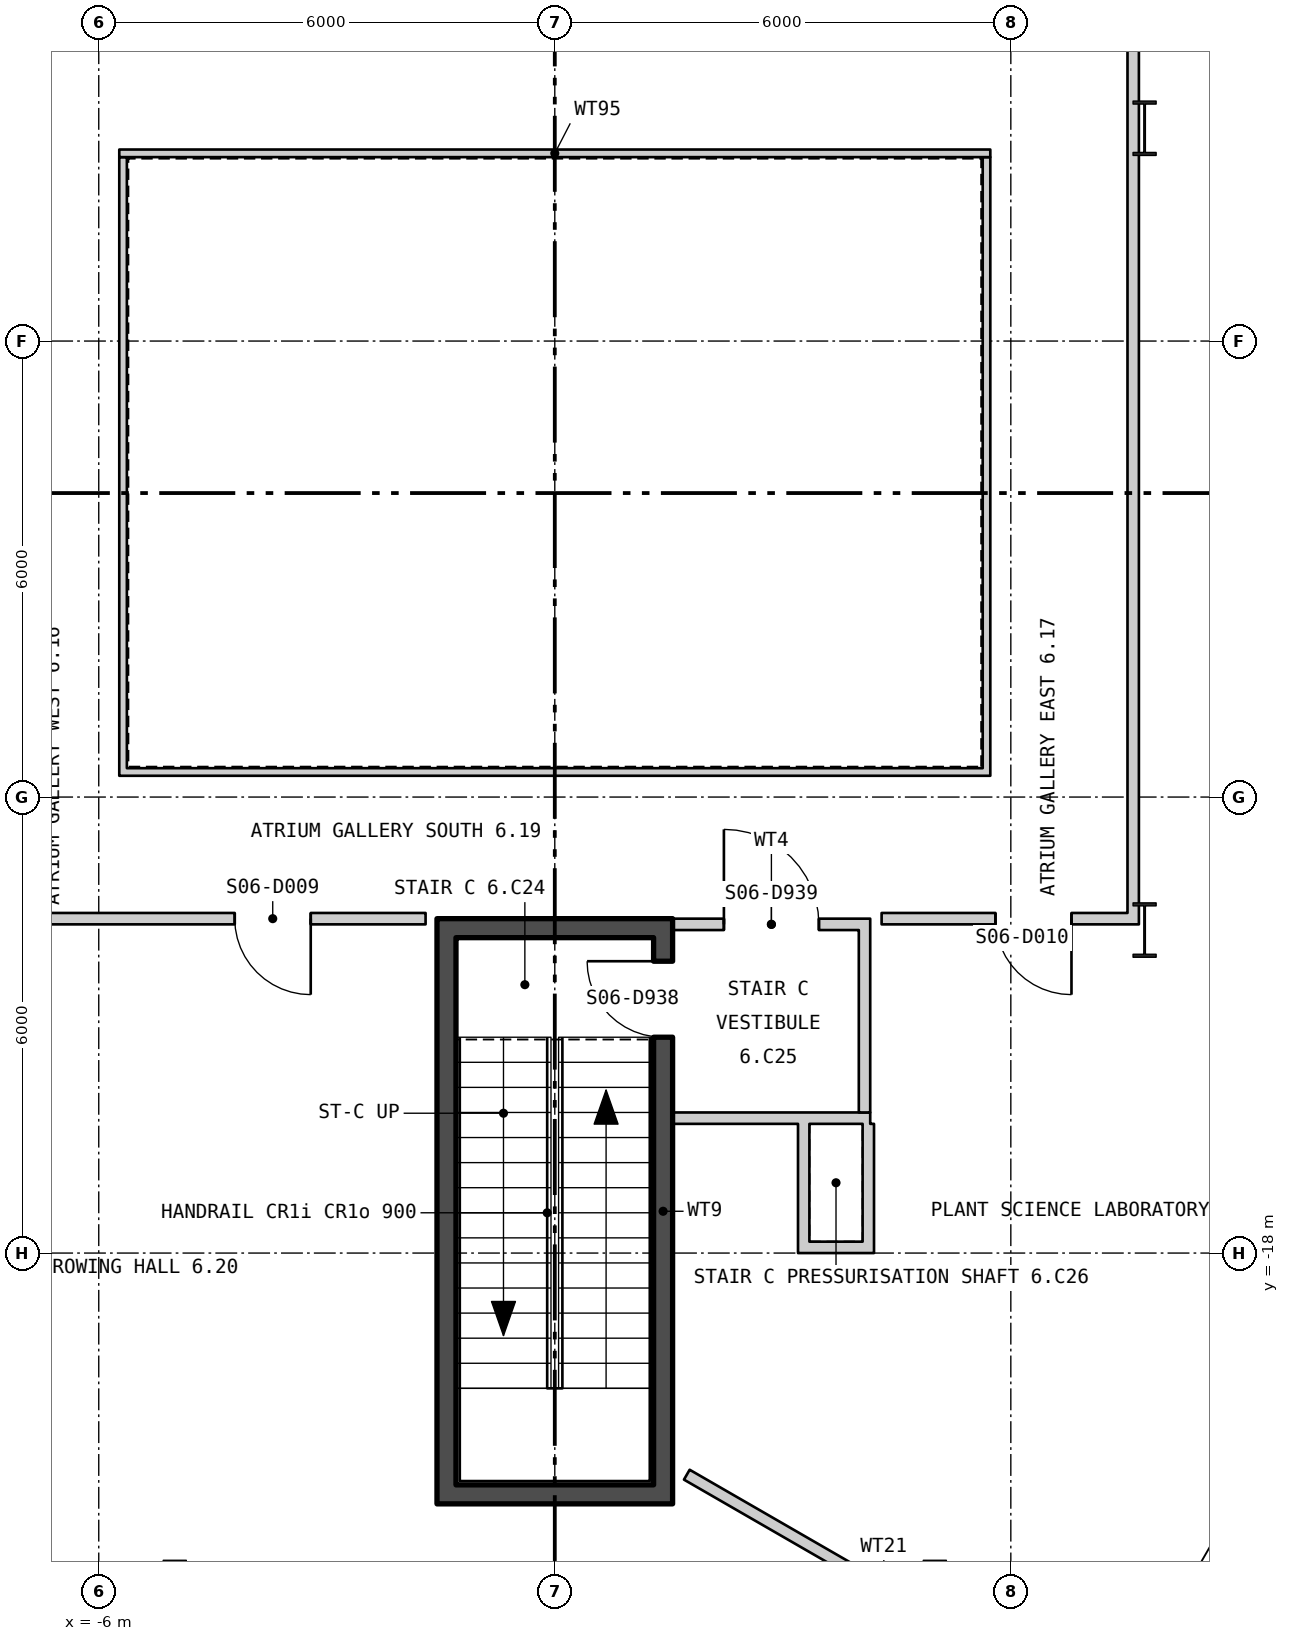
"""IFC4 building model, lengths in metres.
Left out: names, types, materials, properties, quantities, classifications, styles, units other than length and angle.
Written with IfcOpenShell. Run it as: python <this file> out.ifc"""

import sys

from ifc_helpers import new_model, si_unit, direction, frame, frame_2d, origin, origin_2d, place, context, subcontext, project, spatial, polyline, rectangle, i_section, outline, extrude, element, fill, save


model = new_model("IFC4")
c1 = context("Model", 3, precision=1e-05, world=origin(), true_north=direction((0.0, 1.0)))
c2 = subcontext(c1, "Body", "Model", "MODEL_VIEW")
j1 = project(units=[si_unit("LENGTHUNIT", "METRE"), si_unit("PLANEANGLEUNIT", "RADIAN")], contexts=[c1])
p1 = place(None, origin())
s1 = spatial("IfcSite", under=j1, at=p1, CompositionType="ELEMENT")
p2 = place(p1, origin())
s2 = spatial("IfcBuilding", under=s1, at=p2, CompositionType="ELEMENT")
p3 = place(p2, frame((0.0, 0.0, 84.3)))
s3 = spatial("IfcBuildingStorey", under=s2, at=p3, CompositionType="ELEMENT", Elevation=84.3)
for number, where, z_axis, x_axis in (
    (1, (7.76, -3.2, 0.0), (0.0, 0.0, 1.0), (1.0, 0.0, 0.0)),
    (2, (7.76, -13.75, 0.0), (0.0, 0.0, 1.0), (1.0, 0.0, 0.0)),
    (3, (5.0, -22.4, 0.0), (0.0, 0.0, 1.0), (1.0, 0.0, 0.0)),
    (4, (-5.0, -22.4, 0.0), (0.0, 0.0, 1.0), (1.0, 0.0, 0.0)),
):
    element("IfcColumn", number, at=place(p3, frame(where, z_axis=z_axis, x_axis=x_axis)), inside=s3, PredefinedType="COLUMN", context=c2, shape_type="SweptSolid", body=[
        extrude(i_section(OverallWidth=0.304, OverallDepth=0.716, WebThickness=0.021, FlangeThickness=0.04, at=origin_2d()), origin(), (0.0, 0.0, 1.0), 4.5),
    ])
p4 = place(p3, frame((-27.95, 11.167, -0.18), z_axis=(0.0, 0.0, 1.0), x_axis=(0.499999194392, -0.866025868902, 0.0)))
e5 = element("IfcWall", 5, at=p4, inside=s3, PredefinedType="SOLIDWALL", context=c2, shape_type="SweptSolid", body=[
    extrude(outline(polyline([(-0.13, -0.225), (45.86, -0.225), (45.6, 0.225), (0.13, 0.225), (-0.13, -0.225)])), origin(), (0.0, 0.0, 1.0), 4.28),
])
p5 = place(p4, frame((5.892, 0.0, 1.08)))
e6 = element("IfcOpeningElement", 6, at=p5, cuts=e5, PredefinedType="OPENING", context=c2, shape_type="SweptSolid", body=[
    extrude(rectangle(XDim=2.4, YDim=2.6, at=frame_2d((1.2, 1.3))), frame((0.0, 0.235, 0.0), z_axis=(0.0, -1.0, 0.0), x_axis=(1.0, 0.0, 0.0)), (0.0, 0.0, 1.0), 0.47),
])
p6 = place(p4, frame((10.399, 0.0, 1.08)))
e7 = element("IfcOpeningElement", 7, at=p6, cuts=e5, PredefinedType="OPENING", context=c2, shape_type="SweptSolid", body=[
    extrude(rectangle(XDim=2.4, YDim=2.6, at=frame_2d((1.2, 1.3))), frame((0.0, 0.235, 0.0), z_axis=(0.0, -1.0, 0.0), x_axis=(1.0, 0.0, 0.0)), (0.0, 0.0, 1.0), 0.47),
])
p7 = place(p4, frame((14.905, 0.0, 1.08)))
e8 = element("IfcOpeningElement", 8, at=p7, cuts=e5, PredefinedType="OPENING", context=c2, shape_type="SweptSolid", body=[
    extrude(rectangle(XDim=2.4, YDim=2.6, at=frame_2d((1.2, 1.3))), frame((0.0, 0.235, 0.0), z_axis=(0.0, -1.0, 0.0), x_axis=(1.0, 0.0, 0.0)), (0.0, 0.0, 1.0), 0.47),
])
p8 = place(p4, frame((19.412, 0.0, 1.08)))
e9 = element("IfcOpeningElement", 9, at=p8, cuts=e5, PredefinedType="OPENING", context=c2, shape_type="SweptSolid", body=[
    extrude(rectangle(XDim=2.4, YDim=2.6, at=frame_2d((1.2, 1.3))), frame((0.0, 0.235, 0.0), z_axis=(0.0, -1.0, 0.0), x_axis=(1.0, 0.0, 0.0)), (0.0, 0.0, 1.0), 0.47),
])
p9 = place(p4, frame((23.918, 0.0, 1.08)))
e10 = element("IfcOpeningElement", 10, at=p9, cuts=e5, PredefinedType="OPENING", context=c2, shape_type="SweptSolid", body=[
    extrude(rectangle(XDim=2.4, YDim=2.6, at=frame_2d((1.2, 1.3))), frame((0.0, 0.235, 0.0), z_axis=(0.0, -1.0, 0.0), x_axis=(1.0, 0.0, 0.0)), (0.0, 0.0, 1.0), 0.47),
])
p10 = place(p4, frame((28.425, 0.0, 1.08)))
e11 = element("IfcOpeningElement", 11, at=p10, cuts=e5, PredefinedType="OPENING", context=c2, shape_type="SweptSolid", body=[
    extrude(rectangle(XDim=2.4, YDim=2.6, at=frame_2d((1.2, 1.3))), frame((0.0, 0.235, 0.0), z_axis=(0.0, -1.0, 0.0), x_axis=(1.0, 0.0, 0.0)), (0.0, 0.0, 1.0), 0.47),
])
p11 = place(p4, frame((32.932, 0.0, 1.08)))
e12 = element("IfcOpeningElement", 12, at=p11, cuts=e5, PredefinedType="OPENING", context=c2, shape_type="SweptSolid", body=[
    extrude(rectangle(XDim=2.4, YDim=2.6, at=frame_2d((1.2, 1.3))), frame((0.0, 0.235, 0.0), z_axis=(0.0, -1.0, 0.0), x_axis=(1.0, 0.0, 0.0)), (0.0, 0.0, 1.0), 0.47),
])
p12 = place(p4, frame((37.438, 0.0, 1.08)))
e13 = element("IfcOpeningElement", 13, at=p12, cuts=e5, PredefinedType="OPENING", context=c2, shape_type="SweptSolid", body=[
    extrude(rectangle(XDim=2.4, YDim=2.6, at=frame_2d((1.2, 1.3))), frame((0.0, 0.235, 0.0), z_axis=(0.0, -1.0, 0.0), x_axis=(1.0, 0.0, 0.0)), (0.0, 0.0, 1.0), 0.47),
])
p13 = place(p4, frame((41.907, 0.0, 1.08)))
e14 = element("IfcOpeningElement", 14, at=p13, cuts=e5, PredefinedType="OPENING", context=c2, shape_type="SweptSolid", body=[
    extrude(rectangle(XDim=2.4, YDim=2.6, at=frame_2d((1.2, 1.3))), frame((0.0, 0.235, 0.0), z_axis=(0.0, -1.0, 0.0), x_axis=(1.0, 0.0, 0.0)), (0.0, 0.0, 1.0), 0.47),
])
p14 = place(p3, frame((5.085, -28.436, -0.18), z_axis=(0.0, 0.0, 1.0), x_axis=(0.499999194392, 0.866025868902, 0.0)))
e15 = element("IfcWall", 15, at=p14, inside=s3, PredefinedType="SOLIDWALL", context=c2, shape_type="SweptSolid", body=[
    extrude(outline(polyline([(-0.13, -0.225), (45.86, -0.225), (45.6, 0.225), (0.13, 0.225), (-0.13, -0.225)])), origin(), (0.0, 0.0, 1.0), 4.28),
])
p15 = place(p14, frame((1.424, 0.0, 1.08)))
e16 = element("IfcOpeningElement", 16, at=p15, cuts=e15, PredefinedType="OPENING", context=c2, shape_type="SweptSolid", body=[
    extrude(rectangle(XDim=2.4, YDim=2.6, at=frame_2d((1.2, 1.3))), frame((0.0, 0.235, 0.0), z_axis=(0.0, -1.0, 0.0), x_axis=(1.0, 0.0, 0.0)), (0.0, 0.0, 1.0), 0.47),
])
p16 = place(p14, frame((5.892, 0.0, 1.08)))
e17 = element("IfcOpeningElement", 17, at=p16, cuts=e15, PredefinedType="OPENING", context=c2, shape_type="SweptSolid", body=[
    extrude(rectangle(XDim=2.4, YDim=2.6, at=frame_2d((1.2, 1.3))), frame((0.0, 0.235, 0.0), z_axis=(0.0, -1.0, 0.0), x_axis=(1.0, 0.0, 0.0)), (0.0, 0.0, 1.0), 0.47),
])
p17 = place(p14, frame((10.399, 0.0, 1.08)))
e18 = element("IfcOpeningElement", 18, at=p17, cuts=e15, PredefinedType="OPENING", context=c2, shape_type="SweptSolid", body=[
    extrude(rectangle(XDim=2.4, YDim=2.6, at=frame_2d((1.2, 1.3))), frame((0.0, 0.235, 0.0), z_axis=(0.0, -1.0, 0.0), x_axis=(1.0, 0.0, 0.0)), (0.0, 0.0, 1.0), 0.47),
])
p18 = place(p14, frame((14.905, 0.0, 1.08)))
e19 = element("IfcOpeningElement", 19, at=p18, cuts=e15, PredefinedType="OPENING", context=c2, shape_type="SweptSolid", body=[
    extrude(rectangle(XDim=2.4, YDim=2.6, at=frame_2d((1.2, 1.3))), frame((0.0, 0.235, 0.0), z_axis=(0.0, -1.0, 0.0), x_axis=(1.0, 0.0, 0.0)), (0.0, 0.0, 1.0), 0.47),
])
p19 = place(p14, frame((19.412, 0.0, 1.08)))
e20 = element("IfcOpeningElement", 20, at=p19, cuts=e15, PredefinedType="OPENING", context=c2, shape_type="SweptSolid", body=[
    extrude(rectangle(XDim=2.4, YDim=2.6, at=frame_2d((1.2, 1.3))), frame((0.0, 0.235, 0.0), z_axis=(0.0, -1.0, 0.0), x_axis=(1.0, 0.0, 0.0)), (0.0, 0.0, 1.0), 0.47),
])
p20 = place(p14, frame((23.918, 0.0, 1.08)))
e21 = element("IfcOpeningElement", 21, at=p20, cuts=e15, PredefinedType="OPENING", context=c2, shape_type="SweptSolid", body=[
    extrude(rectangle(XDim=2.4, YDim=2.6, at=frame_2d((1.2, 1.3))), frame((0.0, 0.235, 0.0), z_axis=(0.0, -1.0, 0.0), x_axis=(1.0, 0.0, 0.0)), (0.0, 0.0, 1.0), 0.47),
])
p21 = place(p14, frame((28.425, 0.0, 1.08)))
e22 = element("IfcOpeningElement", 22, at=p21, cuts=e15, PredefinedType="OPENING", context=c2, shape_type="SweptSolid", body=[
    extrude(rectangle(XDim=2.4, YDim=2.6, at=frame_2d((1.2, 1.3))), frame((0.0, 0.235, 0.0), z_axis=(0.0, -1.0, 0.0), x_axis=(1.0, 0.0, 0.0)), (0.0, 0.0, 1.0), 0.47),
])
p22 = place(p14, frame((32.932, 0.0, 1.08)))
e23 = element("IfcOpeningElement", 23, at=p22, cuts=e15, PredefinedType="OPENING", context=c2, shape_type="SweptSolid", body=[
    extrude(rectangle(XDim=2.4, YDim=2.6, at=frame_2d((1.2, 1.3))), frame((0.0, 0.235, 0.0), z_axis=(0.0, -1.0, 0.0), x_axis=(1.0, 0.0, 0.0)), (0.0, 0.0, 1.0), 0.47),
])
p23 = place(p14, frame((37.438, 0.0, 1.08)))
e24 = element("IfcOpeningElement", 24, at=p23, cuts=e15, PredefinedType="OPENING", context=c2, shape_type="SweptSolid", body=[
    extrude(rectangle(XDim=2.4, YDim=2.6, at=frame_2d((1.2, 1.3))), frame((0.0, 0.235, 0.0), z_axis=(0.0, -1.0, 0.0), x_axis=(1.0, 0.0, 0.0)), (0.0, 0.0, 1.0), 0.47),
])
p24 = place(p14, frame((41.907, 0.0, 1.08)))
e25 = element("IfcOpeningElement", 25, at=p24, cuts=e15, PredefinedType="OPENING", context=c2, shape_type="SweptSolid", body=[
    extrude(rectangle(XDim=2.4, YDim=2.6, at=frame_2d((1.2, 1.3))), frame((0.0, 0.235, 0.0), z_axis=(0.0, -1.0, 0.0), x_axis=(1.0, 0.0, 0.0)), (0.0, 0.0, 1.0), 0.47),
])
p25 = place(p3, frame((-5.73, -11.67, 0.0), z_axis=(0.0, 0.0, 1.0), x_axis=(1.0, 0.0, 0.0)))
e26 = element("IfcWall", 26, at=p25, inside=s3, PredefinedType="PARTITIONING", context=c2, shape_type="SweptSolid", body=[
    extrude(rectangle(XDim=11.46, YDim=0.1, at=frame_2d((5.73, 0.0))), origin(), (0.0, 0.0, 1.0), 4.3),
])
p26 = place(p3, frame((5.68, -11.62, 0.0), z_axis=(0.0, 0.0, 1.0), x_axis=(0.0, 1.0, 0.0)))
e27 = element("IfcWall", 27, at=p26, inside=s3, PredefinedType="PARTITIONING", context=c2, shape_type="SweptSolid", body=[
    extrude(rectangle(XDim=8.04, YDim=0.1, at=frame_2d((4.02, 0.0))), origin(), (0.0, 0.0, 1.0), 4.3),
])
p27 = place(p3, frame((5.73, -3.53, 0.0), z_axis=(0.0, 0.0, 1.0), x_axis=(-1.0, 0.0, 0.0)))
e28 = element("IfcWall", 28, at=p27, inside=s3, PredefinedType="PARTITIONING", context=c2, shape_type="SweptSolid", body=[
    extrude(rectangle(XDim=11.46, YDim=0.1, at=frame_2d((5.73, 0.0))), origin(), (0.0, 0.0, 1.0), 4.3),
])
p28 = place(p3, frame((-5.68, -3.58, 0.0), z_axis=(0.0, 0.0, 1.0), x_axis=(0.0, -1.0, 0.0)))
e29 = element("IfcWall", 29, at=p28, inside=s3, PredefinedType="PARTITIONING", context=c2, shape_type="SweptSolid", body=[
    extrude(rectangle(XDim=8.04, YDim=0.1, at=frame_2d((4.02, 0.0))), origin(), (0.0, 0.0, 1.0), 4.3),
])
p29 = place(p3, frame((-1.425, -21.05, 0.0), z_axis=(0.0, 0.0, 1.0), x_axis=(0.0, 1.0, 0.0)))
e30 = element("IfcWall", 30, at=p29, inside=s3, PredefinedType="SHEAR", context=c2, shape_type="SweptSolid", body=[
    extrude(rectangle(XDim=7.2, YDim=0.25, at=frame_2d((3.6, 0.0))), origin(), (0.0, 0.0, 1.0), 4.3),
])
p30 = place(p3, frame((1.425, -21.05, 0.0), z_axis=(0.0, 0.0, 1.0), x_axis=(0.0, 1.0, 0.0)))
e31 = element("IfcWall", 31, at=p30, inside=s3, PredefinedType="SHEAR", context=c2, shape_type="SweptSolid", body=[
    extrude(rectangle(XDim=7.2, YDim=0.25, at=frame_2d((3.6, 0.0))), origin(), (0.0, 0.0, 1.0), 4.3),
])
p31 = place(p30, frame((5.89, 0.0, 0.0)))
e32 = element("IfcOpeningElement", 32, at=p31, cuts=e31, PredefinedType="OPENING", context=c2, shape_type="SweptSolid", body=[
    extrude(rectangle(XDim=1.0, YDim=2.1, at=frame_2d((0.5, 1.05))), frame((0.0, 0.135, 0.0), z_axis=(0.0, -1.0, 0.0), x_axis=(1.0, 0.0, 0.0)), (0.0, 0.0, 1.0), 0.27),
])
for number, where, z_axis, x_axis in (
    (33, (-1.55, -21.175, 0.0), (0.0, 0.0, 1.0), (1.0, 0.0, 0.0)),
    (34, (-1.55, -13.725, 0.0), (0.0, 0.0, 1.0), (1.0, 0.0, 0.0)),
):
    element("IfcWall", number, at=place(p3, frame(where, z_axis=z_axis, x_axis=x_axis)), inside=s3, PredefinedType="SHEAR", context=c2, shape_type="SweptSolid", body=[
        extrude(rectangle(XDim=3.1, YDim=0.25, at=frame_2d((1.55, 0.0))), origin(), (0.0, 0.0, 1.0), 4.3),
    ])
p32 = place(p3, frame((1.55, -16.225, 0.0), z_axis=(0.0, 0.0, 1.0), x_axis=(1.0, 0.0, 0.0)))
e35 = element("IfcWall", 35, at=p32, inside=s3, PredefinedType="PARTITIONING", context=c2, shape_type="SweptSolid", body=[
    extrude(rectangle(XDim=2.6, YDim=0.15, at=frame_2d((1.3, 0.0))), origin(), (0.0, 0.0, 1.0), 4.3),
])
p33 = place(p3, frame((4.075, -16.15, 0.0), z_axis=(0.0, 0.0, 1.0), x_axis=(0.0, 1.0, 0.0)))
e36 = element("IfcWall", 36, at=p33, inside=s3, PredefinedType="PARTITIONING", context=c2, shape_type="SweptSolid", body=[
    extrude(rectangle(XDim=2.4, YDim=0.15, at=frame_2d((1.2, 0.0))), origin(), (0.0, 0.0, 1.0), 4.3),
])
p34 = place(p3, frame((1.55, -13.675, 0.0), z_axis=(0.0, 0.0, 1.0), x_axis=(1.0, 0.0, 0.0)))
e37 = element("IfcWall", 37, at=p34, inside=s3, PredefinedType="PARTITIONING", context=c2, shape_type="SweptSolid", body=[
    extrude(rectangle(XDim=2.6, YDim=0.15, at=frame_2d((1.3, 0.0))), origin(), (0.0, 0.0, 1.0), 3.39),
])
p35 = place(p34, frame((0.675, 0.0, 0.0)))
e38 = element("IfcOpeningElement", 38, at=p35, cuts=e37, PredefinedType="OPENING", context=c2, shape_type="SweptSolid", body=[
    extrude(rectangle(XDim=1.25, YDim=2.1, at=frame_2d((0.625, 1.05))), frame((0.0, 0.085, 0.0), z_axis=(0.0, -1.0, 0.0), x_axis=(1.0, 0.0, 0.0)), (0.0, 0.0, 1.0), 0.17),
])
p36 = place(p3, frame((3.275, -18.0, 0.0), z_axis=(0.0, 0.0, 1.0), x_axis=(0.0, 1.0, 0.0)))
e39 = element("IfcWall", 39, at=p36, inside=s3, PredefinedType="PARTITIONING", context=c2, shape_type="SweptSolid", body=[
    extrude(rectangle(XDim=1.7, YDim=0.15, at=frame_2d((0.85, 0.0))), origin(), (0.0, 0.0, 1.0), 3.7),
])
p37 = place(p3, frame((3.35, -17.925, 0.0), z_axis=(0.0, 0.0, 1.0), x_axis=(1.0, 0.0, 0.0)))
e40 = element("IfcWall", 40, at=p37, inside=s3, PredefinedType="PARTITIONING", context=c2, shape_type="SweptSolid", body=[
    extrude(rectangle(XDim=0.7, YDim=0.15, at=frame_2d((0.35, 0.0))), origin(), (0.0, 0.0, 1.0), 4.3),
])
p38 = place(p3, frame((4.125, -18.0, 0.0), z_axis=(0.0, 0.0, 1.0), x_axis=(0.0, 1.0, 0.0)))
e41 = element("IfcWall", 41, at=p38, inside=s3, PredefinedType="PARTITIONING", context=c2, shape_type="SweptSolid", body=[
    extrude(rectangle(XDim=1.7, YDim=0.15, at=frame_2d((0.85, 0.0))), origin(), (0.0, 0.0, 1.0), 4.3),
])
p39 = place(p3, frame((-7.535, -13.6, 0.0), z_axis=(0.0, 0.0, 1.0), x_axis=(1.0, 0.0, 0.0)))
e42 = element("IfcWall", 42, at=p39, inside=s3, PredefinedType="PARTITIONING", context=c2, shape_type="SweptSolid", body=[
    extrude(rectangle(XDim=5.835, YDim=0.15, at=frame_2d((2.917, 0.0))), origin(), (0.0, 0.0, 1.0), 3.39),
])
p40 = place(p39, frame((3.324, 0.0, 0.0)))
e43 = element("IfcOpeningElement", 43, at=p40, cuts=e42, PredefinedType="OPENING", context=c2, shape_type="SweptSolid", body=[
    extrude(rectangle(XDim=1.0, YDim=2.1, at=frame_2d((0.5, 1.05))), frame((0.0, 0.085, 0.0), z_axis=(0.0, -1.0, 0.0), x_axis=(1.0, 0.0, 0.0)), (0.0, 0.0, 1.0), 0.17),
])
p41 = place(p3, frame((1.737, -20.916, 0.0), z_axis=(0.0, 0.0, 1.0), x_axis=(0.866168895605, -0.499751382476, 0.0)))
e44 = element("IfcWall", 44, at=p41, inside=s3, PredefinedType="PARTITIONING", context=c2, shape_type="SweptSolid", body=[
    extrude(rectangle(XDim=5.985, YDim=0.15, at=frame_2d((2.993, 0.0))), origin(), (0.0, 0.0, 1.0), 4.3),
])
p42 = place(p3, frame((4.3, -13.6, 0.0), z_axis=(0.0, 0.0, 1.0), x_axis=(1.0, 0.0, 0.0)))
e45 = element("IfcWall", 45, at=p42, inside=s3, PredefinedType="PARTITIONING", context=c2, shape_type="SweptSolid", body=[
    extrude(rectangle(XDim=3.235, YDim=0.15, at=frame_2d((1.617, 0.0))), origin(), (0.0, 0.0, 1.0), 3.39),
])
p43 = place(p42, frame((1.498, 0.0, 0.0)))
e46 = element("IfcOpeningElement", 46, at=p43, cuts=e45, PredefinedType="OPENING", context=c2, shape_type="SweptSolid", body=[
    extrude(rectangle(XDim=1.0, YDim=2.1, at=frame_2d((0.5, 1.05))), frame((0.0, 0.085, 0.0), z_axis=(0.0, -1.0, 0.0), x_axis=(1.0, 0.0, 0.0)), (0.0, 0.0, 1.0), 0.17),
])
p44 = place(p3, frame((7.61, -13.675, 0.0), z_axis=(0.0, 0.0, 1.0), x_axis=(0.0, 1.0, 0.0)))
e47 = element("IfcWall", 47, at=p44, inside=s3, PredefinedType="PARTITIONING", context=c2, shape_type="SweptSolid", body=[
    extrude(rectangle(XDim=10.167, YDim=0.15, at=frame_2d((5.083, 0.0))), origin(), (0.0, 0.0, 1.0), 3.7),
])
p45 = place(p3, frame((7.61, -3.508, 0.0), z_axis=(0.0, 0.0, 1.0), x_axis=(0.0, 1.0, 0.0)))
e48 = element("IfcWall", 48, at=p45, inside=s3, PredefinedType="PARTITIONING", context=c2, shape_type="SweptSolid", body=[
    extrude(rectangle(XDim=1.719, YDim=0.15, at=frame_2d((0.86, 0.0))), origin(), (0.0, 0.0, 1.0), 4.3),
])
p46 = place(p16, origin())
e49 = element("IfcWindow", 49, at=p46, inside=s3, PartitioningType="SINGLE_PANEL", PredefinedType="WINDOW", context=c2, shape_type="SweptSolid", body=[
    extrude(rectangle(XDim=2.4, YDim=2.6, at=frame_2d((1.2, 1.3))), frame((0.0, 0.105, 0.0), z_axis=(0.0, -1.0, 0.0), x_axis=(1.0, 0.0, 0.0)), (0.0, 0.0, 1.0), 0.06),
])
fill(e17, e49)
p47 = place(p31, origin())
e50 = element("IfcDoor", 50, at=p47, inside=s3, OperationType="SINGLE_SWING_LEFT", PredefinedType="DOOR", context=c2, shape_type="SweptSolid", body=[
    extrude(rectangle(XDim=1.0, YDim=2.1, at=frame_2d((0.5, 1.05))), frame((0.0, 0.025, 0.0), z_axis=(0.0, -1.0, 0.0), x_axis=(1.0, 0.0, 0.0)), (0.0, 0.0, 1.0), 0.05),
])
fill(e32, e50)
p48 = place(p35, origin())
e51 = element("IfcDoor", 51, at=p48, inside=s3, OperationType="SINGLE_SWING_RIGHT", PredefinedType="DOOR", context=c2, shape_type="SweptSolid", body=[
    extrude(rectangle(XDim=1.25, YDim=2.1, at=frame_2d((0.625, 1.05))), frame((0.0, 0.025, 0.0), z_axis=(0.0, -1.0, 0.0), x_axis=(1.0, 0.0, 0.0)), (0.0, 0.0, 1.0), 0.05),
])
fill(e38, e51)
p49 = place(p40, origin())
e52 = element("IfcDoor", 52, at=p49, inside=s3, OperationType="SINGLE_SWING_RIGHT", PredefinedType="DOOR", context=c2, shape_type="SweptSolid", body=[
    extrude(rectangle(XDim=1.0, YDim=2.1, at=frame_2d((0.5, 1.05))), frame((0.0, 0.025, 0.0), z_axis=(0.0, -1.0, 0.0), x_axis=(1.0, 0.0, 0.0)), (0.0, 0.0, 1.0), 0.05),
])
fill(e43, e52)
p50 = place(p43, origin())
e53 = element("IfcDoor", 53, at=p50, inside=s3, OperationType="SINGLE_SWING_RIGHT", PredefinedType="DOOR", context=c2, shape_type="SweptSolid", body=[
    extrude(rectangle(XDim=1.0, YDim=2.1, at=frame_2d((0.5, 1.05))), frame((0.0, 0.025, 0.0), z_axis=(0.0, -1.0, 0.0), x_axis=(1.0, 0.0, 0.0)), (0.0, 0.0, 1.0), 0.05),
])
fill(e46, e53)
save(model, sys.argv[1])
